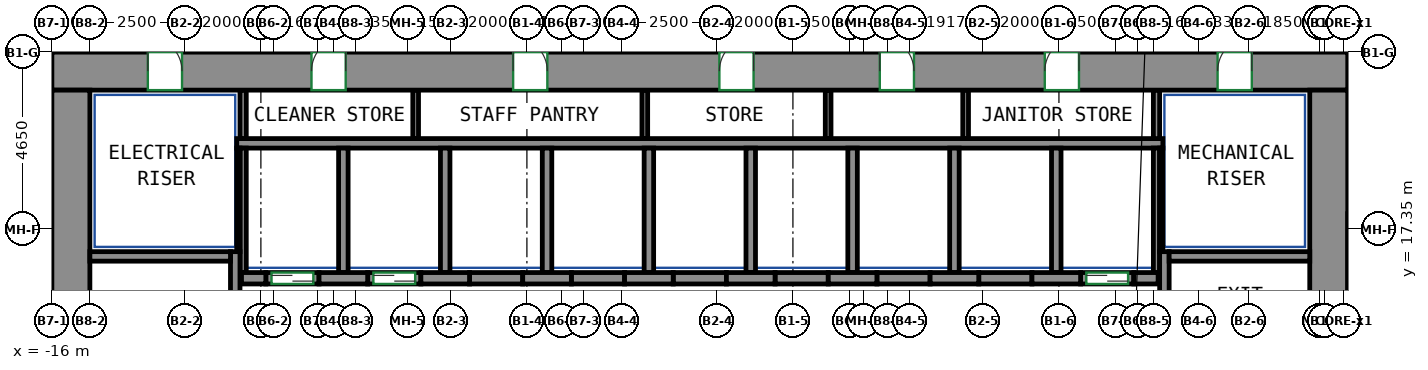
"""IFC4 building model, lengths in metres.
Left out: names, types, materials, properties, quantities, classifications, styles, units other than length and angle.
Written with IfcOpenShell. Run it as: python <this file> out.ifc"""

import sys

from ifc_helpers import new_model, si_unit, direction, frame, frame_2d, origin, place, context, subcontext, project, spatial, rectangle, extrude, source, transform, mapped, element, fill, save


model = new_model("IFC4")
c1 = context("Model", 3, precision=1e-05, world=origin(), true_north=direction((0.0, 1.0)))
c2 = subcontext(c1, "Body", "Model", "MODEL_VIEW")
j1 = project(units=[si_unit("LENGTHUNIT", "METRE"), si_unit("PLANEANGLEUNIT", "RADIAN")], contexts=[c1])
p1 = place(None, origin())
s1 = spatial("IfcSite", under=j1, at=p1, CompositionType="ELEMENT")
p2 = place(p1, origin())
s2 = spatial("IfcBuilding", under=s1, at=p2, CompositionType="ELEMENT")
p3 = place(p2, frame((0.0, 0.0, 47.0)))
s3 = spatial("IfcBuildingStorey", under=s2, at=p3, CompositionType="ELEMENT", Elevation=47.0)
m1 = source(origin(), c2, "Body", "SweptSolid", [
    extrude(rectangle(XDim=34.1, YDim=1.0, at=frame_2d((17.05, 0.0))), origin(), (0.0, 0.0, 1.0), 3.72),
])
p4 = place(p3, frame((-16.0, 21.5, 0.0), z_axis=(0.0, 0.0, 1.0), x_axis=(1.0, 0.0, 0.0)))
e1 = element("IfcWall", 1, at=p4, inside=s3, PredefinedType="SHEAR", context=c2, shape_type="MappedRepresentation", body=[
    mapped(m1, transform((0.0, 0.0, 0.0))),
])
p5 = place(p4, frame((6.831, 0.0, 0.0)))
e2 = element("IfcOpeningElement", 2, at=p5, cuts=e1, PredefinedType="OPENING", context=c2, shape_type="SweptSolid", body=[
    extrude(rectangle(XDim=0.9, YDim=2.1, at=frame_2d((0.45, 1.05))), frame((0.0, 0.51, 0.0), z_axis=(0.0, -1.0, 0.0), x_axis=(1.0, 0.0, 0.0)), (0.0, 0.0, 1.0), 1.02),
])
p6 = place(p4, frame((12.138, 0.0, 0.0)))
e3 = element("IfcOpeningElement", 3, at=p6, cuts=e1, PredefinedType="OPENING", context=c2, shape_type="SweptSolid", body=[
    extrude(rectangle(XDim=0.9, YDim=2.1, at=frame_2d((0.45, 1.05))), frame((0.0, 0.51, 0.0), z_axis=(0.0, -1.0, 0.0), x_axis=(1.0, 0.0, 0.0)), (0.0, 0.0, 1.0), 1.02),
])
p7 = place(p4, frame((17.565, 0.0, 0.0)))
e4 = element("IfcOpeningElement", 4, at=p7, cuts=e1, PredefinedType="OPENING", context=c2, shape_type="SweptSolid", body=[
    extrude(rectangle(XDim=0.9, YDim=2.1, at=frame_2d((0.45, 1.05))), frame((0.0, 0.51, 0.0), z_axis=(0.0, -1.0, 0.0), x_axis=(1.0, 0.0, 0.0)), (0.0, 0.0, 1.0), 1.02),
])
p8 = place(p4, frame((21.786, 0.0, 0.0)))
e5 = element("IfcOpeningElement", 5, at=p8, cuts=e1, PredefinedType="OPENING", context=c2, shape_type="SweptSolid", body=[
    extrude(rectangle(XDim=0.9, YDim=2.1, at=frame_2d((0.45, 1.05))), frame((0.0, 0.51, 0.0), z_axis=(0.0, -1.0, 0.0), x_axis=(1.0, 0.0, 0.0)), (0.0, 0.0, 1.0), 1.02),
])
p9 = place(p4, frame((26.127, 0.0, 0.0)))
e6 = element("IfcOpeningElement", 6, at=p9, cuts=e1, PredefinedType="OPENING", context=c2, shape_type="SweptSolid", body=[
    extrude(rectangle(XDim=0.9, YDim=2.1, at=frame_2d((0.45, 1.05))), frame((0.0, 0.51, 0.0), z_axis=(0.0, -1.0, 0.0), x_axis=(1.0, 0.0, 0.0)), (0.0, 0.0, 1.0), 1.02),
])
p10 = place(p4, frame((2.525, 0.0, 0.0)))
e7 = element("IfcOpeningElement", 7, at=p10, cuts=e1, PredefinedType="OPENING", context=c2, shape_type="SweptSolid", body=[
    extrude(rectangle(XDim=0.9, YDim=2.1, at=frame_2d((0.45, 1.05))), frame((0.0, 0.51, 0.0), z_axis=(0.0, -1.0, 0.0), x_axis=(1.0, 0.0, 0.0)), (0.0, 0.0, 1.0), 1.02),
])
p11 = place(p4, frame((30.675, 0.0, 0.0)))
e8 = element("IfcOpeningElement", 8, at=p11, cuts=e1, PredefinedType="OPENING", context=c2, shape_type="SweptSolid", body=[
    extrude(rectangle(XDim=0.9, YDim=2.1, at=frame_2d((0.45, 1.05))), frame((0.0, 0.51, 0.0), z_axis=(0.0, -1.0, 0.0), x_axis=(1.0, 0.0, 0.0)), (0.0, 0.0, 1.0), 1.02),
])
m2 = source(origin(), c2, "Body", "SweptSolid", [
    extrude(rectangle(XDim=12.0, YDim=1.0, at=frame_2d((6.0, 0.0))), origin(), (0.0, 0.0, 1.0), 3.72),
])
for number, where, z_axis, x_axis in (
    (9, (-15.5, 9.0, 0.0), (0.0, 0.0, 1.0), (0.0, 1.0, 0.0)),
    (10, (17.6, 9.0, 0.0), (0.0, 0.0, 1.0), (0.0, 1.0, 0.0)),
):
    element("IfcWall", number, at=place(p3, frame(where, z_axis=z_axis, x_axis=x_axis)), inside=s3, PredefinedType="SHEAR", context=c2, shape_type="MappedRepresentation", body=[
        mapped(m2, transform((0.0, 0.0, 0.0))),
    ])
m3 = source(origin(), c2, "Body", "SweptSolid", [
    extrude(rectangle(XDim=7.75, YDim=0.25, at=frame_2d((3.875, 0.0))), origin(), (0.0, 0.0, 1.0), 3.72),
])
p12 = place(p3, frame((-11.175, 9.0, 0.0), z_axis=(0.0, 0.0, 1.0), x_axis=(0.0, 1.0, 0.0)))
e11 = element("IfcWall", 11, at=p12, inside=s3, PredefinedType="SHEAR", context=c2, shape_type="MappedRepresentation", body=[
    mapped(m3, transform((0.0, 0.0, 0.0))),
])
m4 = source(origin(), c2, "Body", "SweptSolid", [
    extrude(rectangle(XDim=3.7, YDim=0.25, at=frame_2d((1.85, 0.0))), origin(), (0.0, 0.0, 1.0), 3.72),
])
p13 = place(p3, frame((-15.0, 16.625, 0.0), z_axis=(0.0, 0.0, 1.0), x_axis=(1.0, 0.0, 0.0)))
e12 = element("IfcWall", 12, at=p13, inside=s3, PredefinedType="SHEAR", context=c2, shape_type="MappedRepresentation", body=[
    mapped(m4, transform((0.0, 0.0, 0.0))),
])
p14 = place(p3, frame((13.275, 9.0, 0.0), z_axis=(0.0, 0.0, 1.0), x_axis=(0.0, 1.0, 0.0)))
e13 = element("IfcWall", 13, at=p14, inside=s3, PredefinedType="SHEAR", context=c2, shape_type="MappedRepresentation", body=[
    mapped(m3, transform((0.0, 0.0, 0.0))),
])
m5 = source(origin(), c2, "Body", "SweptSolid", [
    extrude(rectangle(XDim=3.7, YDim=0.25, at=frame_2d((1.85, 0.0))), origin(), (0.0, 0.0, 1.0), 3.72),
])
p15 = place(p3, frame((13.4, 16.625, 0.0), z_axis=(0.0, 0.0, 1.0), x_axis=(1.0, 0.0, 0.0)))
e14 = element("IfcWall", 14, at=p15, inside=s3, PredefinedType="SHEAR", context=c2, shape_type="MappedRepresentation", body=[
    mapped(m5, transform((0.0, 0.0, 0.0))),
])
m6 = source(origin(), c2, "Body", "SweptSolid", [
    extrude(rectangle(XDim=0.64, YDim=0.3, at=frame_2d((0.32, 0.0))), origin(), (0.0, 0.0, 1.0), 3.72),
])
p16 = place(p3, frame((-11.01, 16.05, 0.0), z_axis=(0.0, 0.0, 1.0), x_axis=(1.0, 0.0, 0.0)))
e15 = element("IfcWall", 15, at=p16, inside=s3, PredefinedType="SHEAR", context=c2, shape_type="MappedRepresentation", body=[
    mapped(m6, transform((0.0, 0.0, 0.0))),
])
m7 = source(origin(), c2, "Body", "SweptSolid", [
    extrude(rectangle(XDim=1.28, YDim=0.3, at=frame_2d((0.64, 0.0))), origin(), (0.0, 0.0, 1.0), 3.72),
])
for number, where, z_axis, x_axis in (
    (16, (-8.97, 16.05, 0.0), (0.0, 0.0, 1.0), (1.0, 0.0, 0.0)),
    (17, (-6.29, 16.05, 0.0), (0.0, 0.0, 1.0), (1.0, 0.0, 0.0)),
    (18, (-3.61, 16.05, 0.0), (0.0, 0.0, 1.0), (1.0, 0.0, 0.0)),
    (19, (-0.93, 16.05, 0.0), (0.0, 0.0, 1.0), (1.0, 0.0, 0.0)),
    (20, (1.75, 16.05, 0.0), (0.0, 0.0, 1.0), (1.0, 0.0, 0.0)),
    (21, (4.43, 16.05, 0.0), (0.0, 0.0, 1.0), (1.0, 0.0, 0.0)),
):
    element("IfcWall", number, at=place(p3, frame(where, z_axis=z_axis, x_axis=x_axis)), inside=s3, PredefinedType="SHEAR", context=c2, shape_type="MappedRepresentation", body=[
        mapped(m7, transform((0.0, 0.0, 0.0))),
    ])
m8 = source(origin(), c2, "Body", "SweptSolid", [
    extrude(rectangle(XDim=1.28, YDim=0.3, at=frame_2d((0.64, 0.0))), origin(), (0.0, 0.0, 1.0), 3.72),
])
p17 = place(p3, frame((7.11, 16.05, 0.0), z_axis=(0.0, 0.0, 1.0), x_axis=(1.0, 0.0, 0.0)))
e22 = element("IfcWall", 22, at=p17, inside=s3, PredefinedType="SHEAR", context=c2, shape_type="MappedRepresentation", body=[
    mapped(m8, transform((0.0, 0.0, 0.0))),
])
p18 = place(p3, frame((9.79, 16.05, 0.0), z_axis=(0.0, 0.0, 1.0), x_axis=(1.0, 0.0, 0.0)))
e23 = element("IfcWall", 23, at=p18, inside=s3, PredefinedType="SHEAR", context=c2, shape_type="MappedRepresentation", body=[
    mapped(m7, transform((0.0, 0.0, 0.0))),
])
m9 = source(origin(), c2, "Body", "SweptSolid", [
    extrude(rectangle(XDim=0.64, YDim=0.3, at=frame_2d((0.32, 0.0))), origin(), (0.0, 0.0, 1.0), 3.72),
])
p19 = place(p3, frame((12.47, 16.05, 0.0), z_axis=(0.0, 0.0, 1.0), x_axis=(1.0, 0.0, 0.0)))
e24 = element("IfcWall", 24, at=p19, inside=s3, PredefinedType="SHEAR", context=c2, shape_type="MappedRepresentation", body=[
    mapped(m9, transform((0.0, 0.0, 0.0))),
])
m10 = source(origin(), c2, "Body", "SweptSolid", [
    extrude(rectangle(XDim=1.4, YDim=0.3, at=frame_2d((0.7, 0.0))), origin(), (0.0, 0.0, 1.0), 3.72),
])
p20 = place(p3, frame((11.07, 16.05, 0.0), z_axis=(0.0, 0.0, 1.0), x_axis=(1.0, 0.0, 0.0)))
e25 = element("IfcWall", 25, at=p20, inside=s3, PredefinedType="PARTITIONING", context=c2, shape_type="MappedRepresentation", body=[
    mapped(m10, transform((0.0, 0.0, 0.0))),
])
p21 = place(p20, frame((0.15, 0.0, 0.0)))
e26 = element("IfcOpeningElement", 26, at=p21, cuts=e25, PredefinedType="OPENING", context=c2, shape_type="SweptSolid", body=[
    extrude(rectangle(XDim=1.1, YDim=2.1, at=frame_2d((0.55, 1.05))), frame((0.0, 0.16, 0.0), z_axis=(0.0, -1.0, 0.0), x_axis=(1.0, 0.0, 0.0)), (0.0, 0.0, 1.0), 0.32),
])
m11 = source(origin(), c2, "Body", "SweptSolid", [
    extrude(rectangle(XDim=1.4, YDim=0.3, at=frame_2d((0.7, 0.0))), origin(), (0.0, 0.0, 1.0), 3.72),
])
p22 = place(p3, frame((-10.37, 16.05, 0.0), z_axis=(0.0, 0.0, 1.0), x_axis=(1.0, 0.0, 0.0)))
e27 = element("IfcWall", 27, at=p22, inside=s3, PredefinedType="PARTITIONING", context=c2, shape_type="MappedRepresentation", body=[
    mapped(m11, transform((0.0, 0.0, 0.0))),
])
p23 = place(p22, frame((0.15, 0.0, 0.0)))
e28 = element("IfcOpeningElement", 28, at=p23, cuts=e27, PredefinedType="OPENING", context=c2, shape_type="SweptSolid", body=[
    extrude(rectangle(XDim=1.1, YDim=2.1, at=frame_2d((0.55, 1.05))), frame((0.0, 0.16, 0.0), z_axis=(0.0, -1.0, 0.0), x_axis=(1.0, 0.0, 0.0)), (0.0, 0.0, 1.0), 0.32),
])
p24 = place(p3, frame((-7.69, 16.05, 0.0), z_axis=(0.0, 0.0, 1.0), x_axis=(1.0, 0.0, 0.0)))
e29 = element("IfcWall", 29, at=p24, inside=s3, PredefinedType="PARTITIONING", context=c2, shape_type="MappedRepresentation", body=[
    mapped(m10, transform((0.0, 0.0, 0.0))),
])
p25 = place(p24, frame((0.15, 0.0, 0.0)))
e30 = element("IfcOpeningElement", 30, at=p25, cuts=e29, PredefinedType="OPENING", context=c2, shape_type="SweptSolid", body=[
    extrude(rectangle(XDim=1.1, YDim=2.1, at=frame_2d((0.55, 1.05))), frame((0.0, 0.16, 0.0), z_axis=(0.0, -1.0, 0.0), x_axis=(1.0, 0.0, 0.0)), (0.0, 0.0, 1.0), 0.32),
])
p26 = place(p3, frame((-5.01, 16.05, 0.0), z_axis=(0.0, 0.0, 1.0), x_axis=(1.0, 0.0, 0.0)))
e31 = element("IfcWall", 31, at=p26, inside=s3, PredefinedType="PARTITIONING", context=c2, shape_type="MappedRepresentation", body=[
    mapped(m10, transform((0.0, 0.0, 0.0))),
])
p27 = place(p3, frame((-2.33, 16.05, 0.0), z_axis=(0.0, 0.0, 1.0), x_axis=(1.0, 0.0, 0.0)))
e32 = element("IfcWall", 32, at=p27, inside=s3, PredefinedType="PARTITIONING", context=c2, shape_type="MappedRepresentation", body=[
    mapped(m11, transform((0.0, 0.0, 0.0))),
])
for number, where, z_axis, x_axis in (
    (33, (0.35, 16.05, 0.0), (0.0, 0.0, 1.0), (1.0, 0.0, 0.0)),
    (34, (3.03, 16.05, 0.0), (0.0, 0.0, 1.0), (1.0, 0.0, 0.0)),
):
    element("IfcWall", number, at=place(p3, frame(where, z_axis=z_axis, x_axis=x_axis)), inside=s3, PredefinedType="PARTITIONING", context=c2, shape_type="MappedRepresentation", body=[
        mapped(m10, transform((0.0, 0.0, 0.0))),
    ])
for number, where, z_axis, x_axis in (
    (35, (5.71, 16.05, 0.0), (0.0, 0.0, 1.0), (1.0, 0.0, 0.0)),
    (36, (8.39, 16.05, 0.0), (0.0, 0.0, 1.0), (1.0, 0.0, 0.0)),
):
    element("IfcWall", number, at=place(p3, frame(where, z_axis=z_axis, x_axis=x_axis)), inside=s3, PredefinedType="PARTITIONING", context=c2, shape_type="MappedRepresentation", body=[
        mapped(m11, transform((0.0, 0.0, 0.0))),
    ])
m12 = source(origin(), c2, "Body", "SweptSolid", [
    extrude(rectangle(XDim=24.37, YDim=0.25, at=frame_2d((12.185, 0.0))), origin(), (0.0, 0.0, 1.0), 3.72),
])
p28 = place(p3, frame((-11.135, 19.6, 0.0), z_axis=(0.0, 0.0, 1.0), x_axis=(1.0, 0.0, 0.0)))
e37 = element("IfcWall", 37, at=p28, inside=s3, PredefinedType="PARTITIONING", context=c2, shape_type="MappedRepresentation", body=[
    mapped(m12, transform((0.0, 0.0, 0.0))),
])
m13 = source(origin(), c2, "Body", "SweptSolid", [
    extrude(rectangle(XDim=3.275, YDim=0.165, at=frame_2d((1.638, 0.0))), origin(), (0.0, 0.0, 1.0), 3.72),
])
p29 = place(p3, frame((13.067, 16.2, 0.0), z_axis=(0.0, 0.0, 1.0), x_axis=(0.0, 1.0, 0.0)))
e38 = element("IfcWall", 38, at=p29, inside=s3, PredefinedType="PARTITIONING", context=c2, shape_type="MappedRepresentation", body=[
    mapped(m13, transform((0.0, 0.0, 0.0))),
])
m14 = source(origin(), c2, "Body", "SweptSolid", [
    extrude(rectangle(XDim=1.275, YDim=0.165, at=frame_2d((0.637, 0.0))), origin(), (0.0, 0.0, 1.0), 3.72),
])
p30 = place(p3, frame((13.067, 19.725, 0.0), z_axis=(0.0, 0.0, 1.0), x_axis=(0.0, 1.0, 0.0)))
e39 = element("IfcWall", 39, at=p30, inside=s3, PredefinedType="PARTITIONING", context=c2, shape_type="MappedRepresentation", body=[
    mapped(m14, transform((0.0, 0.0, 0.0))),
])
p31 = place(p3, frame((-10.968, 16.2, 0.0), z_axis=(0.0, 0.0, 1.0), x_axis=(0.0, 1.0, 0.0)))
e40 = element("IfcWall", 40, at=p31, inside=s3, PredefinedType="PARTITIONING", context=c2, shape_type="MappedRepresentation", body=[
    mapped(m13, transform((0.0, 0.0, 0.0))),
])
p32 = place(p3, frame((-10.968, 19.725, 0.0), z_axis=(0.0, 0.0, 1.0), x_axis=(0.0, 1.0, 0.0)))
e41 = element("IfcWall", 41, at=p32, inside=s3, PredefinedType="PARTITIONING", context=c2, shape_type="MappedRepresentation", body=[
    mapped(m14, transform((0.0, 0.0, 0.0))),
])
m15 = source(origin(), c2, "Body", "SweptSolid", [
    extrude(rectangle(XDim=3.275, YDim=0.25, at=frame_2d((1.638, 0.0))), origin(), (0.0, 0.0, 1.0), 3.72),
])
p33 = place(p3, frame((10.43, 16.2, 0.0), z_axis=(0.0, 0.0, 1.0), x_axis=(0.0, 1.0, 0.0)))
e42 = element("IfcWall", 42, at=p33, inside=s3, PredefinedType="PARTITIONING", context=c2, shape_type="MappedRepresentation", body=[
    mapped(m15, transform((0.0, 0.0, 0.0))),
])
m16 = source(origin(), c2, "Body", "SweptSolid", [
    extrude(rectangle(XDim=2.725, YDim=0.085, at=frame_2d((1.363, 0.0))), origin(), (0.0, 0.0, 1.0), 3.72),
])
p34 = place(p3, frame((13.192, 16.75, 0.0), z_axis=(0.0, 0.0, 1.0), x_axis=(0.0, 1.0, 0.0)))
e43 = element("IfcWall", 43, at=p34, inside=s3, PredefinedType="PARTITIONING", context=c2, shape_type="MappedRepresentation", body=[
    mapped(m16, transform((0.0, 0.0, 0.0))),
])
for number, where, z_axis, x_axis in (
    (44, (2.39, 16.2, 0.0), (0.0, 0.0, 1.0), (0.0, 1.0, 0.0)),
    (45, (5.07, 16.2, 0.0), (0.0, 0.0, 1.0), (0.0, 1.0, 0.0)),
    (46, (7.75, 16.2, 0.0), (0.0, 0.0, 1.0), (0.0, 1.0, 0.0)),
    (47, (-0.29, 16.2, 0.0), (0.0, 0.0, 1.0), (0.0, 1.0, 0.0)),
):
    element("IfcWall", number, at=place(p3, frame(where, z_axis=z_axis, x_axis=x_axis)), inside=s3, PredefinedType="PARTITIONING", context=c2, shape_type="MappedRepresentation", body=[
        mapped(m15, transform((0.0, 0.0, 0.0))),
    ])
p35 = place(p3, frame((-11.093, 16.75, 0.0), z_axis=(0.0, 0.0, 1.0), x_axis=(0.0, 1.0, 0.0)))
e48 = element("IfcWall", 48, at=p35, inside=s3, PredefinedType="PARTITIONING", context=c2, shape_type="MappedRepresentation", body=[
    mapped(m16, transform((0.0, 0.0, 0.0))),
])
for number, where, z_axis, x_axis in (
    (49, (-2.97, 16.2, 0.0), (0.0, 0.0, 1.0), (0.0, 1.0, 0.0)),
    (50, (-5.65, 16.2, 0.0), (0.0, 0.0, 1.0), (0.0, 1.0, 0.0)),
    (51, (-8.33, 16.2, 0.0), (0.0, 0.0, 1.0), (0.0, 1.0, 0.0)),
):
    element("IfcWall", number, at=place(p3, frame(where, z_axis=z_axis, x_axis=x_axis)), inside=s3, PredefinedType="PARTITIONING", context=c2, shape_type="MappedRepresentation", body=[
        mapped(m15, transform((0.0, 0.0, 0.0))),
    ])
m17 = source(origin(), c2, "Body", "SweptSolid", [
    extrude(rectangle(XDim=1.275, YDim=0.15, at=frame_2d((0.637, 0.0))), origin(), (0.0, 0.0, 1.0), 3.72),
])
for number, where, z_axis, x_axis in (
    (52, (-6.427, 19.725, 0.0), (0.0, 0.0, 1.0), (0.0, 1.0, 0.0)),
    (53, (-0.397, 19.725, 0.0), (0.0, 0.0, 1.0), (0.0, 1.0, 0.0)),
    (54, (4.427, 19.725, 0.0), (0.0, 0.0, 1.0), (0.0, 1.0, 0.0)),
    (55, (8.045, 19.725, 0.0), (0.0, 0.0, 1.0), (0.0, 1.0, 0.0)),
):
    element("IfcWall", number, at=place(p3, frame(where, z_axis=z_axis, x_axis=x_axis)), inside=s3, PredefinedType="PARTITIONING", context=c2, shape_type="MappedRepresentation", body=[
        mapped(m17, transform((0.0, 0.0, 0.0))),
    ])
p36 = place(p21, origin())
e56 = element("IfcDoor", 56, at=p36, inside=s3, OperationType="DOUBLE_DOOR_SLIDING", PredefinedType="DOOR", context=c2, shape_type="SweptSolid", body=[
    extrude(rectangle(XDim=1.1, YDim=2.1, at=frame_2d((0.55, 1.05))), frame((0.0, 0.025, 0.0), z_axis=(0.0, -1.0, 0.0), x_axis=(1.0, 0.0, 0.0)), (0.0, 0.0, 1.0), 0.05),
])
fill(e26, e56)
p37 = place(p23, origin())
e57 = element("IfcDoor", 57, at=p37, inside=s3, OperationType="DOUBLE_DOOR_SLIDING", PredefinedType="DOOR", context=c2, shape_type="SweptSolid", body=[
    extrude(rectangle(XDim=1.1, YDim=2.1, at=frame_2d((0.55, 1.05))), frame((0.0, 0.025, 0.0), z_axis=(0.0, -1.0, 0.0), x_axis=(1.0, 0.0, 0.0)), (0.0, 0.0, 1.0), 0.05),
])
fill(e28, e57)
p38 = place(p25, origin())
e58 = element("IfcDoor", 58, at=p38, inside=s3, OperationType="DOUBLE_DOOR_SLIDING", PredefinedType="DOOR", context=c2, shape_type="SweptSolid", body=[
    extrude(rectangle(XDim=1.1, YDim=2.1, at=frame_2d((0.55, 1.05))), frame((0.0, 0.025, 0.0), z_axis=(0.0, -1.0, 0.0), x_axis=(1.0, 0.0, 0.0)), (0.0, 0.0, 1.0), 0.05),
])
fill(e30, e58)
p39 = place(p5, origin())
e59 = element("IfcDoor", 59, at=p39, inside=s3, OperationType="SINGLE_SWING_RIGHT", PredefinedType="DOOR", context=c2, shape_type="SweptSolid", body=[
    extrude(rectangle(XDim=0.9, YDim=2.1, at=frame_2d((0.45, 1.05))), frame((0.0, -0.355, 0.0), z_axis=(0.0, -1.0, 0.0), x_axis=(1.0, 0.0, 0.0)), (0.0, 0.0, 1.0), 0.05),
])
fill(e2, e59)
p40 = place(p6, origin())
e60 = element("IfcDoor", 60, at=p40, inside=s3, OperationType="SINGLE_SWING_LEFT", PredefinedType="DOOR", context=c2, shape_type="SweptSolid", body=[
    extrude(rectangle(XDim=0.9, YDim=2.1, at=frame_2d((0.45, 1.05))), frame((0.0, -0.355, 0.0), z_axis=(0.0, -1.0, 0.0), x_axis=(1.0, 0.0, 0.0)), (0.0, 0.0, 1.0), 0.05),
])
fill(e3, e60)
p41 = place(p7, origin())
e61 = element("IfcDoor", 61, at=p41, inside=s3, OperationType="SINGLE_SWING_RIGHT", PredefinedType="DOOR", context=c2, shape_type="SweptSolid", body=[
    extrude(rectangle(XDim=0.9, YDim=2.1, at=frame_2d((0.45, 1.05))), frame((0.0, -0.355, 0.0), z_axis=(0.0, -1.0, 0.0), x_axis=(1.0, 0.0, 0.0)), (0.0, 0.0, 1.0), 0.05),
])
fill(e4, e61)
p42 = place(p8, origin())
e62 = element("IfcDoor", 62, at=p42, inside=s3, OperationType="SINGLE_SWING_LEFT", PredefinedType="DOOR", context=c2, shape_type="SweptSolid", body=[
    extrude(rectangle(XDim=0.9, YDim=2.1, at=frame_2d((0.45, 1.05))), frame((0.0, -0.355, 0.0), z_axis=(0.0, -1.0, 0.0), x_axis=(1.0, 0.0, 0.0)), (0.0, 0.0, 1.0), 0.05),
])
fill(e5, e62)
p43 = place(p9, origin())
e63 = element("IfcDoor", 63, at=p43, inside=s3, OperationType="SINGLE_SWING_RIGHT", PredefinedType="DOOR", context=c2, shape_type="SweptSolid", body=[
    extrude(rectangle(XDim=0.9, YDim=2.1, at=frame_2d((0.45, 1.05))), frame((0.0, -0.355, 0.0), z_axis=(0.0, -1.0, 0.0), x_axis=(1.0, 0.0, 0.0)), (0.0, 0.0, 1.0), 0.05),
])
fill(e6, e63)
p44 = place(p10, origin())
e64 = element("IfcDoor", 64, at=p44, inside=s3, OperationType="SINGLE_SWING_LEFT", PredefinedType="DOOR", context=c2, shape_type="SweptSolid", body=[
    extrude(rectangle(XDim=0.9, YDim=2.1, at=frame_2d((0.45, 1.05))), frame((0.0, -0.355, 0.0), z_axis=(0.0, -1.0, 0.0), x_axis=(1.0, 0.0, 0.0)), (0.0, 0.0, 1.0), 0.05),
])
fill(e7, e64)
p45 = place(p11, origin())
e65 = element("IfcDoor", 65, at=p45, inside=s3, OperationType="SINGLE_SWING_RIGHT", PredefinedType="DOOR", context=c2, shape_type="SweptSolid", body=[
    extrude(rectangle(XDim=0.9, YDim=2.1, at=frame_2d((0.45, 1.05))), frame((0.0, -0.355, 0.0), z_axis=(0.0, -1.0, 0.0), x_axis=(1.0, 0.0, 0.0)), (0.0, 0.0, 1.0), 0.05),
])
fill(e8, e65)
save(model, sys.argv[1])
